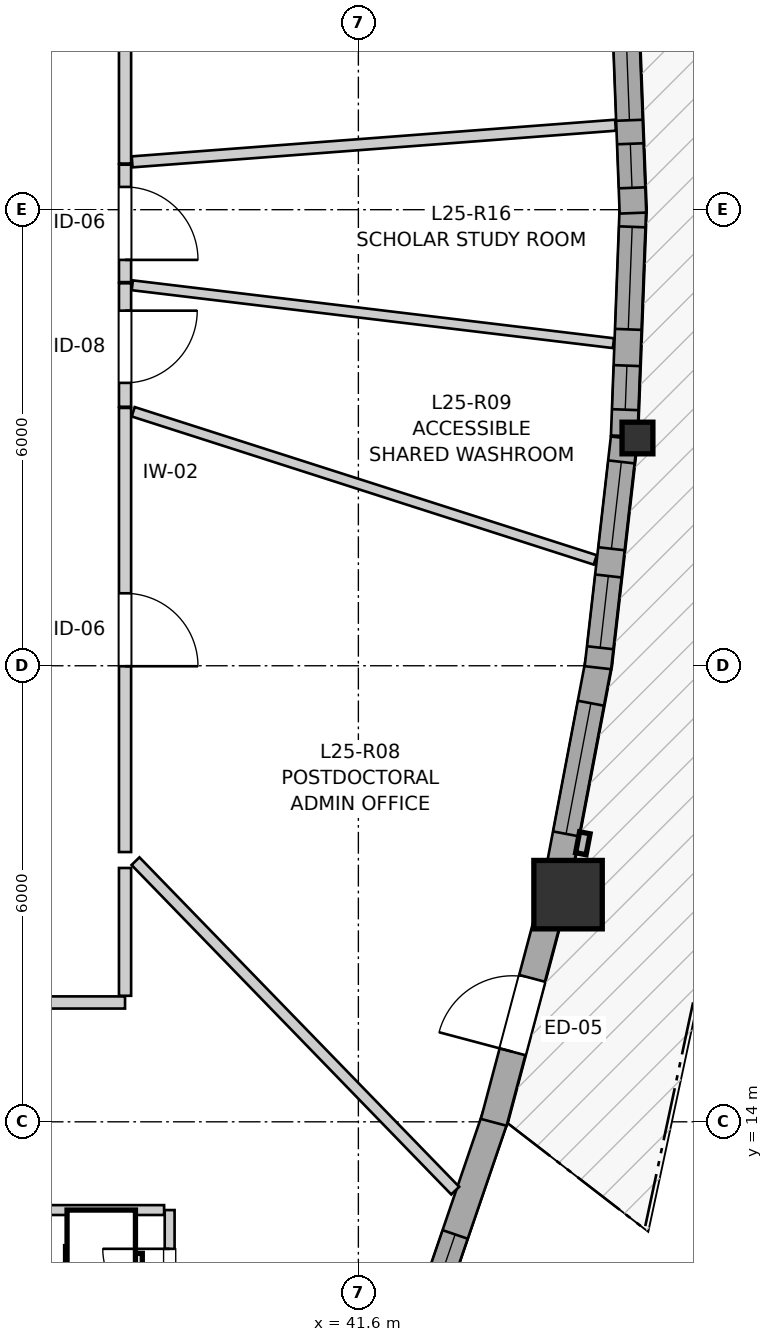
"""IFC4 building model, lengths in metres.
Left out: names, types, materials, properties, quantities, classifications, styles, units other than length and angle.
Written with IfcOpenShell. Run it as: python <this file> out.ifc"""

import sys

from ifc_helpers import new_model, si_unit, direction, frame, frame_2d, origin, origin_2d, place, context, subcontext, project, spatial, rectangle, i_section, extrude, source, transform, mapped, element, fill, save


model = new_model("IFC4")
c1 = context("Model", 3, precision=1e-05, world=origin(), true_north=direction((0.0, 1.0)))
c2 = subcontext(c1, "Body", "Model", "MODEL_VIEW")
j1 = project(units=[si_unit("LENGTHUNIT", "METRE"), si_unit("PLANEANGLEUNIT", "RADIAN")], contexts=[c1])
p1 = place(None, origin())
s1 = spatial("IfcSite", under=j1, at=p1, CompositionType="ELEMENT")
p2 = place(p1, origin())
s2 = spatial("IfcBuilding", under=s1, at=p2, CompositionType="ELEMENT")
p3 = place(p2, frame((0.0, 0.0, 86.4)))
s3 = spatial("IfcBuildingStorey", under=s2, at=p3, CompositionType="ELEMENT", Elevation=86.4)
m1 = source(origin(), c2, "Body", "SweptSolid", [
    extrude(rectangle(XDim=0.9, YDim=0.9, at=origin_2d()), origin(), (0.0, 0.0, 1.0), 2.95),
])
p4 = place(p3, frame((44.359, 16.989, 0.0), z_axis=(0.0, 0.0, 1.0), x_axis=(1.0, 0.0, 0.0)))
e1 = element("IfcColumn", 1, at=p4, inside=s3, PredefinedType="COLUMN", context=c2, shape_type="MappedRepresentation", body=[
    mapped(m1, transform((0.0, 0.0, 0.0), x_axis=(1.0, 0.0, 0.0), y_axis=(0.0, 1.0, 0.0), z_axis=(0.0, 0.0, 1.0), scale=1.0)),
])
m2 = source(origin(), c2, "Body", "SweptSolid", [
    extrude(i_section(OverallWidth=0.406, OverallDepth=0.416, WebThickness=0.027, FlangeThickness=0.044, FilletRadius=0.015, at=origin_2d()), origin(), (0.0, 0.0, 1.0), 2.95),
])
p5 = place(p3, frame((45.272, 22.996, 0.0), z_axis=(0.0, 0.0, 1.0), x_axis=(1.0, 0.0, 0.0)))
e2 = element("IfcColumn", 2, at=p5, inside=s3, PredefinedType="PILASTER", context=c2, shape_type="MappedRepresentation", body=[
    mapped(m2, transform((0.0, 0.0, 0.0), x_axis=(1.0, 0.0, 0.0), y_axis=(0.0, 1.0, 0.0), z_axis=(0.0, 0.0, 1.0), scale=1.0)),
])
p6 = place(p3, frame((42.373, 11.057, 0.0), z_axis=(0.0, 0.0, 1.0), x_axis=(0.323628226775, 0.946184321808, 0.0)))
e3 = element("IfcWall", 3, at=p6, inside=s3, PredefinedType="SOLIDWALL", context=c2, shape_type="SweptSolid", body=[
    extrude(rectangle(XDim=3.193, YDim=0.35, at=frame_2d((1.596, 0.0))), origin(), (0.0, 0.0, 1.0), 2.48),
])
p7 = place(p6, frame((0.595, 0.0, 0.82)))
e4 = element("IfcOpeningElement", 4, at=p7, cuts=e3, PredefinedType="OPENING", context=c2, shape_type="SweptSolid", body=[
    extrude(rectangle(XDim=0.95, YDim=1.35, at=frame_2d((0.475, 0.675))), frame((0.0, 0.185, 0.0), z_axis=(0.0, -1.0, 0.0), x_axis=(1.0, 0.0, 0.0)), (0.0, 0.0, 1.0), 0.37),
])
p8 = place(p3, frame((43.381, 13.993, 0.0), z_axis=(0.0, 0.0, 1.0), x_axis=(0.257079998736, 0.966390125286, 0.0)))
e5 = element("IfcWall", 5, at=p8, inside=s3, PredefinedType="SOLIDWALL", context=c2, shape_type="SweptSolid", body=[
    extrude(rectangle(XDim=2.921, YDim=0.35, at=frame_2d((1.46, 0.0))), origin(), (0.0, 0.0, 1.0), 2.48),
])
p9 = place(p8, frame((0.961, 0.0, 0.0)))
e6 = element("IfcOpeningElement", 6, at=p9, cuts=e5, PredefinedType="OPENING", context=c2, shape_type="SweptSolid", body=[
    extrude(rectangle(XDim=1.0, YDim=2.1, at=frame_2d((0.5, 1.05))), frame((0.0, 0.185, 0.0), z_axis=(0.0, -1.0, 0.0), x_axis=(1.0, 0.0, 0.0)), (0.0, 0.0, 1.0), 0.37),
])
p10 = place(p3, frame((44.229, 17.242, 0.0), z_axis=(0.0, 0.0, 1.0), x_axis=(0.186588413417, 0.982438173107, 0.0)))
e7 = element("IfcWall", 7, at=p10, inside=s3, PredefinedType="SOLIDWALL", context=c2, shape_type="SweptSolid", body=[
    extrude(rectangle(XDim=2.871, YDim=0.35, at=frame_2d((1.436, 0.0))), origin(), (0.0, 0.0, 1.0), 2.48),
])
p11 = place(p10, frame((0.555, 0.0, 0.82)))
e8 = element("IfcOpeningElement", 8, at=p11, cuts=e7, PredefinedType="OPENING", context=c2, shape_type="SweptSolid", body=[
    extrude(rectangle(XDim=1.75, YDim=1.3, at=frame_2d((0.875, 0.65))), frame((0.0, 0.185, 0.0), z_axis=(0.0, -1.0, 0.0), x_axis=(1.0, 0.0, 0.0)), (0.0, 0.0, 1.0), 0.37),
])
p12 = place(p3, frame((44.751, 19.975, 0.0), z_axis=(0.0, 0.0, 1.0), x_axis=(0.113356399423, 0.993554390413, 0.0)))
e9 = element("IfcWall", 9, at=p12, inside=s3, PredefinedType="SOLIDWALL", context=c2, shape_type="SweptSolid", body=[
    extrude(rectangle(XDim=3.041, YDim=0.35, at=frame_2d((1.521, 0.0))), origin(), (0.0, 0.0, 1.0), 2.48),
])
p13 = place(p12, frame((0.264, 0.0, 0.82)))
e10 = element("IfcOpeningElement", 10, at=p13, cuts=e9, PredefinedType="OPENING", context=c2, shape_type="SweptSolid", body=[
    extrude(rectangle(XDim=0.95, YDim=1.35, at=frame_2d((0.475, 0.675))), frame((0.0, 0.185, 0.0), z_axis=(0.0, -1.0, 0.0), x_axis=(1.0, 0.0, 0.0)), (0.0, 0.0, 1.0), 0.37),
])
p14 = place(p12, frame((1.575, 0.0, 0.82)))
e11 = element("IfcOpeningElement", 11, at=p14, cuts=e9, PredefinedType="OPENING", context=c2, shape_type="SweptSolid", body=[
    extrude(rectangle(XDim=1.15, YDim=1.2, at=frame_2d((0.575, 0.6))), frame((0.0, 0.185, 0.0), z_axis=(0.0, -1.0, 0.0), x_axis=(1.0, 0.0, 0.0)), (0.0, 0.0, 1.0), 0.37),
])
p15 = place(p3, frame((45.098, 23.023, 0.0), z_axis=(0.0, 0.0, 1.0), x_axis=(0.037943250197, 0.999279895607, 0.0)))
e12 = element("IfcWall", 12, at=p15, inside=s3, PredefinedType="SOLIDWALL", context=c2, shape_type="SweptSolid", body=[
    extrude(rectangle(XDim=3.024, YDim=0.35, at=frame_2d((1.512, 0.0))), origin(), (0.0, 0.0, 1.0), 2.48),
])
p16 = place(p15, frame((0.346, 0.0, 0.82)))
e13 = element("IfcOpeningElement", 13, at=p16, cuts=e12, PredefinedType="OPENING", context=c2, shape_type="SweptSolid", body=[
    extrude(rectangle(XDim=0.58, YDim=1.35, at=frame_2d((0.29, 0.675))), frame((0.0, 0.185, 0.0), z_axis=(0.0, -1.0, 0.0), x_axis=(1.0, 0.0, 0.0)), (0.0, 0.0, 1.0), 0.37),
])
p17 = place(p15, frame((1.404, 0.0, 0.82)))
e14 = element("IfcOpeningElement", 14, at=p17, cuts=e12, PredefinedType="OPENING", context=c2, shape_type="SweptSolid", body=[
    extrude(rectangle(XDim=1.35, YDim=1.45, at=frame_2d((0.675, 0.725))), frame((0.0, 0.185, 0.0), z_axis=(0.0, -1.0, 0.0), x_axis=(1.0, 0.0, 0.0)), (0.0, 0.0, 1.0), 0.37),
])
p18 = place(p3, frame((45.213, 25.955, 0.0), z_axis=(0.0, 0.0, 1.0), x_axis=(-0.037934195255, 0.999280239388, 0.0)))
e15 = element("IfcWall", 15, at=p18, inside=s3, PredefinedType="SOLIDWALL", context=c2, shape_type="SweptSolid", body=[
    extrude(rectangle(XDim=2.819, YDim=0.35, at=frame_2d((1.409, 0.0))), origin(), (0.0, 0.0, 1.0), 2.48),
])
p19 = place(p18, frame((0.332, 0.0, 0.82)))
e16 = element("IfcOpeningElement", 16, at=p19, cuts=e15, PredefinedType="OPENING", context=c2, shape_type="SweptSolid", body=[
    extrude(rectangle(XDim=0.58, YDim=1.35, at=frame_2d((0.29, 0.675))), frame((0.0, 0.185, 0.0), z_axis=(0.0, -1.0, 0.0), x_axis=(1.0, 0.0, 0.0)), (0.0, 0.0, 1.0), 0.37),
])
p20 = place(p18, frame((1.222, 0.0, 0.82)))
e17 = element("IfcOpeningElement", 17, at=p20, cuts=e15, PredefinedType="OPENING", context=c2, shape_type="SweptSolid", body=[
    extrude(rectangle(XDim=1.15, YDim=1.2, at=frame_2d((0.575, 0.6))), frame((0.0, 0.185, 0.0), z_axis=(0.0, -1.0, 0.0), x_axis=(1.0, 0.0, 0.0)), (0.0, 0.0, 1.0), 0.37),
])
p21 = place(p3, frame((38.53, 23.392, 0.0), z_axis=(0.0, 0.0, 1.0), x_axis=(0.0, -1.0, 0.0)))
e18 = element("IfcWall", 18, at=p21, inside=s3, PredefinedType="PARTITIONING", context=c2, shape_type="SweptSolid", body=[
    extrude(rectangle(XDim=5.843, YDim=0.16, at=frame_2d((2.921, 0.0))), origin(), (0.0, 0.0, 1.0), 2.95),
])
p22 = place(p21, frame((2.438, 0.0, 0.0)))
e19 = element("IfcOpeningElement", 19, at=p22, cuts=e18, PredefinedType="OPENING", context=c2, shape_type="SweptSolid", body=[
    extrude(rectangle(XDim=0.96, YDim=2.1, at=frame_2d((0.48, 1.05))), frame((0.0, 0.09, 0.0), z_axis=(0.0, -1.0, 0.0), x_axis=(1.0, 0.0, 0.0)), (0.0, 0.0, 1.0), 0.18),
])
p23 = place(p3, frame((38.53, 31.856, 0.0), z_axis=(0.0, 0.0, 1.0), x_axis=(0.0, -1.0, 0.0)))
e20 = element("IfcWall", 20, at=p23, inside=s3, PredefinedType="PARTITIONING", context=c2, shape_type="SweptSolid", body=[
    extrude(rectangle(XDim=5.249, YDim=0.16, at=frame_2d((2.625, 0.0))), origin(), (0.0, 0.0, 1.0), 2.95),
])
p24 = place(p23, frame((2.146, 0.0, 0.0)))
e21 = element("IfcOpeningElement", 21, at=p24, cuts=e20, PredefinedType="OPENING", context=c2, shape_type="SweptSolid", body=[
    extrude(rectangle(XDim=0.96, YDim=2.1, at=frame_2d((0.48, 1.05))), frame((0.0, 0.09, 0.0), z_axis=(0.0, -1.0, 0.0), x_axis=(1.0, 0.0, 0.0)), (0.0, 0.0, 1.0), 0.18),
])
p25 = place(p3, frame((38.53, 15.57, 0.0), z_axis=(0.0, 0.0, 1.0), x_axis=(-1.0, 0.0, 0.0)))
e22 = element("IfcWall", 22, at=p25, inside=s3, PredefinedType="PARTITIONING", context=c2, shape_type="SweptSolid", body=[
    extrude(rectangle(XDim=3.257, YDim=0.16, at=frame_2d((1.628, 0.0))), origin(), (0.0, 0.0, 1.0), 2.95),
])
p26 = place(p25, frame((1.16, 0.0, 0.0)))
e23 = element("IfcOpeningElement", 23, at=p26, cuts=e22, PredefinedType="OPENING", context=c2, shape_type="SweptSolid", body=[
    extrude(rectangle(XDim=0.92, YDim=2.1, at=frame_2d((0.46, 1.05))), frame((0.0, 0.09, 0.0), z_axis=(0.0, -1.0, 0.0), x_axis=(1.0, 0.0, 0.0)), (0.0, 0.0, 1.0), 0.18),
])
p27 = place(p3, frame((39.117, 10.939, 0.0), z_axis=(0.0, 0.0, 1.0), x_axis=(0.0, 1.0, 0.0)))
e24 = element("IfcWall", 24, at=p27, inside=s3, PredefinedType="PARTITIONING", context=c2, shape_type="SweptSolid", body=[
    extrude(rectangle(XDim=1.9, YDim=0.13, at=frame_2d((0.95, 0.0))), origin(), (0.0, 0.0, 1.0), 2.95),
])
p28 = place(p27, frame((0.51, 0.0, 0.0)))
e25 = element("IfcOpeningElement", 25, at=p28, cuts=e24, PredefinedType="OPENING", context=c2, shape_type="SweptSolid", body=[
    extrude(rectangle(XDim=0.88, YDim=2.05, at=frame_2d((0.44, 1.025))), frame((0.0, 0.075, 0.0), z_axis=(0.0, -1.0, 0.0), x_axis=(1.0, 0.0, 0.0)), (0.0, 0.0, 1.0), 0.15),
])
p29 = place(p3, frame((38.53, 25.032, 0.0), z_axis=(0.0, 0.0, 1.0), x_axis=(0.0, -1.0, 0.0)))
e26 = element("IfcWall", 26, at=p29, inside=s3, PredefinedType="PARTITIONING", context=c2, shape_type="SweptSolid", body=[
    extrude(rectangle(XDim=1.625, YDim=0.16, at=frame_2d((0.812, 0.0))), origin(), (0.0, 0.0, 1.0), 2.95),
])
p30 = place(p29, frame((0.361, 0.0, 0.0)))
e27 = element("IfcOpeningElement", 27, at=p30, cuts=e26, PredefinedType="OPENING", context=c2, shape_type="SweptSolid", body=[
    extrude(rectangle(XDim=0.95, YDim=2.1, at=frame_2d((0.475, 1.05))), frame((0.0, 0.09, 0.0), z_axis=(0.0, -1.0, 0.0), x_axis=(1.0, 0.0, 0.0)), (0.0, 0.0, 1.0), 0.18),
])
p31 = place(p3, frame((38.53, 26.592, 0.0), z_axis=(0.0, 0.0, 1.0), x_axis=(0.0, -1.0, 0.0)))
e28 = element("IfcWall", 28, at=p31, inside=s3, PredefinedType="PARTITIONING", context=c2, shape_type="SweptSolid", body=[
    extrude(rectangle(XDim=1.545, YDim=0.16, at=frame_2d((0.772, 0.0))), origin(), (0.0, 0.0, 1.0), 2.95),
])
p32 = place(p31, frame((0.292, 0.0, 0.0)))
e29 = element("IfcOpeningElement", 29, at=p32, cuts=e28, PredefinedType="OPENING", context=c2, shape_type="SweptSolid", body=[
    extrude(rectangle(XDim=0.96, YDim=2.1, at=frame_2d((0.48, 1.05))), frame((0.0, 0.09, 0.0), z_axis=(0.0, -1.0, 0.0), x_axis=(1.0, 0.0, 0.0)), (0.0, 0.0, 1.0), 0.18),
])
p33 = place(p3, frame((38.637, 23.342, 0.0), z_axis=(0.0, 0.0, 1.0), x_axis=(0.952253923936, -0.305307163933, 0.0)))
e30 = element("IfcWall", 30, at=p33, inside=s3, PredefinedType="PARTITIONING", context=c2, shape_type="SweptSolid", body=[
    extrude(rectangle(XDim=6.384, YDim=0.13, at=frame_2d((3.192, 0.0))), origin(), (0.0, 0.0, 1.0), 2.95),
])
p34 = place(p3, frame((38.626, 25.006, 0.0), z_axis=(0.0, 0.0, 1.0), x_axis=(0.992837647249, -0.11947136144, 0.0)))
e31 = element("IfcWall", 31, at=p34, inside=s3, PredefinedType="PARTITIONING", context=c2, shape_type="SweptSolid", body=[
    extrude(rectangle(XDim=6.376, YDim=0.13, at=frame_2d((3.188, 0.0))), origin(), (0.0, 0.0, 1.0), 2.95),
])
p35 = place(p3, frame((38.624, 26.629, 0.0), z_axis=(0.0, 0.0, 1.0), x_axis=(0.997137880159, 0.075604549805, 0.0)))
e32 = element("IfcWall", 32, at=p35, inside=s3, PredefinedType="PARTITIONING", context=c2, shape_type="SweptSolid", body=[
    extrude(rectangle(XDim=6.378, YDim=0.145, at=frame_2d((3.189, 0.0))), origin(), (0.0, 0.0, 1.0), 2.95),
])
p36 = place(p3, frame((38.667, 17.429, 0.0), z_axis=(0.0, 0.0, 1.0), x_axis=(0.696417222112, -0.717637131666, 0.0)))
e33 = element("IfcWall", 33, at=p36, inside=s3, PredefinedType="PARTITIONING", context=c2, shape_type="SweptSolid", body=[
    extrude(rectangle(XDim=6.04, YDim=0.145, at=frame_2d((3.02, 0.0))), origin(), (0.0, 0.0, 1.0), 2.95),
])
p37 = place(p3, frame((38.53, 15.658, 0.0), z_axis=(0.0, 0.0, 1.0), x_axis=(0.0, 1.0, 0.0)))
e34 = element("IfcWall", 34, at=p37, inside=s3, PredefinedType="PARTITIONING", context=c2, shape_type="SweptSolid", body=[
    extrude(rectangle(XDim=1.682, YDim=0.16, at=frame_2d((0.841, 0.0))), origin(), (0.0, 0.0, 1.0), 2.95),
])
p38 = place(p3, frame((37.317, 12.839, 0.0), z_axis=(0.0, 0.0, 1.0), x_axis=(1.0, 0.0, 0.0)))
e35 = element("IfcWall", 35, at=p38, inside=s3, PredefinedType="PARTITIONING", context=c2, shape_type="SweptSolid", body=[
    extrude(rectangle(XDim=1.727, YDim=0.13, at=frame_2d((0.864, 0.0))), origin(), (0.0, 0.0, 1.0), 2.95),
])
m3 = source(origin(), c2, "Body", "SweptSolid", [
    extrude(rectangle(XDim=0.95, YDim=1.35, at=frame_2d((0.475, 0.675))), frame((0.0, 0.03, 0.0), z_axis=(0.0, -1.0, 0.0), x_axis=(1.0, 0.0, 0.0)), (0.0, 0.0, 1.0), 0.06),
])
p39 = place(p7, origin())
e36 = element("IfcWindow", 36, at=p39, inside=s3, PartitioningType="SINGLE_PANEL", PredefinedType="WINDOW", context=c2, shape_type="MappedRepresentation", body=[
    mapped(m3, transform((0.0, 0.0, 0.0), x_axis=(1.0, 0.0, 0.0), y_axis=(0.0, 1.0, 0.0), z_axis=(0.0, 0.0, 1.0), scale=1.0)),
])
fill(e4, e36)
m4 = source(origin(), c2, "Body", "SweptSolid", [
    extrude(rectangle(XDim=1.75, YDim=1.3, at=frame_2d((0.875, 0.65))), frame((0.0, 0.03, 0.0), z_axis=(0.0, -1.0, 0.0), x_axis=(1.0, 0.0, 0.0)), (0.0, 0.0, 1.0), 0.06),
])
p40 = place(p11, origin())
e37 = element("IfcWindow", 37, at=p40, inside=s3, PartitioningType="SINGLE_PANEL", PredefinedType="WINDOW", context=c2, shape_type="MappedRepresentation", body=[
    mapped(m4, transform((0.0, 0.0, 0.0), x_axis=(1.0, 0.0, 0.0), y_axis=(0.0, 1.0, 0.0), z_axis=(0.0, 0.0, 1.0), scale=1.0)),
])
fill(e8, e37)
p41 = place(p13, origin())
e38 = element("IfcWindow", 38, at=p41, inside=s3, PartitioningType="SINGLE_PANEL", PredefinedType="WINDOW", context=c2, shape_type="MappedRepresentation", body=[
    mapped(m3, transform((0.0, 0.0, 0.0), x_axis=(1.0, 0.0, 0.0), y_axis=(0.0, 1.0, 0.0), z_axis=(0.0, 0.0, 1.0), scale=1.0)),
])
fill(e10, e38)
m5 = source(origin(), c2, "Body", "SweptSolid", [
    extrude(rectangle(XDim=1.15, YDim=1.2, at=frame_2d((0.575, 0.6))), frame((0.0, 0.03, 0.0), z_axis=(0.0, -1.0, 0.0), x_axis=(1.0, 0.0, 0.0)), (0.0, 0.0, 1.0), 0.06),
])
p42 = place(p14, origin())
e39 = element("IfcWindow", 39, at=p42, inside=s3, PartitioningType="SINGLE_PANEL", PredefinedType="WINDOW", context=c2, shape_type="MappedRepresentation", body=[
    mapped(m5, transform((0.0, 0.0, 0.0), x_axis=(1.0, 0.0, 0.0), y_axis=(0.0, 1.0, 0.0), z_axis=(0.0, 0.0, 1.0), scale=1.0)),
])
fill(e11, e39)
m6 = source(origin(), c2, "Body", "SweptSolid", [
    extrude(rectangle(XDim=0.58, YDim=1.35, at=frame_2d((0.29, 0.675))), frame((0.0, 0.03, 0.0), z_axis=(0.0, -1.0, 0.0), x_axis=(1.0, 0.0, 0.0)), (0.0, 0.0, 1.0), 0.06),
])
p43 = place(p16, origin())
e40 = element("IfcWindow", 40, at=p43, inside=s3, PartitioningType="SINGLE_PANEL", PredefinedType="WINDOW", context=c2, shape_type="MappedRepresentation", body=[
    mapped(m6, transform((0.0, 0.0, 0.0), x_axis=(1.0, 0.0, 0.0), y_axis=(0.0, 1.0, 0.0), z_axis=(0.0, 0.0, 1.0), scale=1.0)),
])
fill(e13, e40)
m7 = source(origin(), c2, "Body", "SweptSolid", [
    extrude(rectangle(XDim=1.35, YDim=1.45, at=frame_2d((0.675, 0.725))), frame((0.0, 0.03, 0.0), z_axis=(0.0, -1.0, 0.0), x_axis=(1.0, 0.0, 0.0)), (0.0, 0.0, 1.0), 0.06),
])
p44 = place(p17, origin())
e41 = element("IfcWindow", 41, at=p44, inside=s3, PartitioningType="SINGLE_PANEL", PredefinedType="WINDOW", context=c2, shape_type="MappedRepresentation", body=[
    mapped(m7, transform((0.0, 0.0, 0.0), x_axis=(1.0, 0.0, 0.0), y_axis=(0.0, 1.0, 0.0), z_axis=(0.0, 0.0, 1.0), scale=1.0)),
])
fill(e14, e41)
p45 = place(p19, origin())
e42 = element("IfcWindow", 42, at=p45, inside=s3, PartitioningType="SINGLE_PANEL", PredefinedType="WINDOW", context=c2, shape_type="MappedRepresentation", body=[
    mapped(m6, transform((0.0, 0.0, 0.0), x_axis=(1.0, 0.0, 0.0), y_axis=(0.0, 1.0, 0.0), z_axis=(0.0, 0.0, 1.0), scale=1.0)),
])
fill(e16, e42)
p46 = place(p20, origin())
e43 = element("IfcWindow", 43, at=p46, inside=s3, PartitioningType="SINGLE_PANEL", PredefinedType="WINDOW", context=c2, shape_type="MappedRepresentation", body=[
    mapped(m5, transform((0.0, 0.0, 0.0), x_axis=(1.0, 0.0, 0.0), y_axis=(0.0, 1.0, 0.0), z_axis=(0.0, 0.0, 1.0), scale=1.0)),
])
fill(e17, e43)
m8 = source(origin(), c2, "Body", "SweptSolid", [
    extrude(rectangle(XDim=1.0, YDim=2.1, at=frame_2d((0.5, 1.05))), frame((0.0, 0.025, 0.0), z_axis=(0.0, -1.0, 0.0), x_axis=(1.0, 0.0, 0.0)), (0.0, 0.0, 1.0), 0.05),
])
p47 = place(p9, origin())
e44 = element("IfcDoor", 44, at=p47, inside=s3, OperationType="SINGLE_SWING_LEFT", PredefinedType="DOOR", context=c2, shape_type="MappedRepresentation", body=[
    mapped(m8, transform((0.0, 0.0, 0.0), x_axis=(1.0, 0.0, 0.0), y_axis=(0.0, 1.0, 0.0), z_axis=(0.0, 0.0, 1.0), scale=1.0)),
])
fill(e6, e44)
m9 = source(origin(), c2, "Body", "SweptSolid", [
    extrude(rectangle(XDim=0.96, YDim=2.1, at=frame_2d((0.48, 1.05))), frame((0.0, 0.025, 0.0), z_axis=(0.0, -1.0, 0.0), x_axis=(1.0, 0.0, 0.0)), (0.0, 0.0, 1.0), 0.05),
])
p48 = place(p22, origin())
e45 = element("IfcDoor", 45, at=p48, inside=s3, OperationType="SINGLE_SWING_RIGHT", PredefinedType="DOOR", context=c2, shape_type="MappedRepresentation", body=[
    mapped(m9, transform((0.0, 0.0, 0.0), x_axis=(1.0, 0.0, 0.0), y_axis=(0.0, 1.0, 0.0), z_axis=(0.0, 0.0, 1.0), scale=1.0)),
])
fill(e19, e45)
m10 = source(origin(), c2, "Body", "SweptSolid", [
    extrude(rectangle(XDim=0.88, YDim=2.05, at=frame_2d((0.44, 1.025))), frame((0.0, 0.025, 0.0), z_axis=(0.0, -1.0, 0.0), x_axis=(1.0, 0.0, 0.0)), (0.0, 0.0, 1.0), 0.05),
])
p49 = place(p28, origin())
e46 = element("IfcDoor", 46, at=p49, inside=s3, OperationType="SINGLE_SWING_RIGHT", PredefinedType="DOOR", context=c2, shape_type="MappedRepresentation", body=[
    mapped(m10, transform((0.0, 0.0, 0.0), x_axis=(1.0, 0.0, 0.0), y_axis=(0.0, 1.0, 0.0), z_axis=(0.0, 0.0, 1.0), scale=1.0)),
])
fill(e25, e46)
m11 = source(origin(), c2, "Body", "SweptSolid", [
    extrude(rectangle(XDim=0.95, YDim=2.1, at=frame_2d((0.475, 1.05))), frame((0.0, 0.025, 0.0), z_axis=(0.0, -1.0, 0.0), x_axis=(1.0, 0.0, 0.0)), (0.0, 0.0, 1.0), 0.05),
])
p50 = place(p30, origin())
e47 = element("IfcDoor", 47, at=p50, inside=s3, OperationType="SINGLE_SWING_LEFT", PredefinedType="DOOR", context=c2, shape_type="MappedRepresentation", body=[
    mapped(m11, transform((0.0, 0.0, 0.0), x_axis=(1.0, 0.0, 0.0), y_axis=(0.0, 1.0, 0.0), z_axis=(0.0, 0.0, 1.0), scale=1.0)),
])
fill(e27, e47)
p51 = place(p32, origin())
e48 = element("IfcDoor", 48, at=p51, inside=s3, OperationType="SINGLE_SWING_RIGHT", PredefinedType="DOOR", context=c2, shape_type="MappedRepresentation", body=[
    mapped(m9, transform((0.0, 0.0, 0.0), x_axis=(1.0, 0.0, 0.0), y_axis=(0.0, 1.0, 0.0), z_axis=(0.0, 0.0, 1.0), scale=1.0)),
])
fill(e29, e48)
save(model, sys.argv[1])
